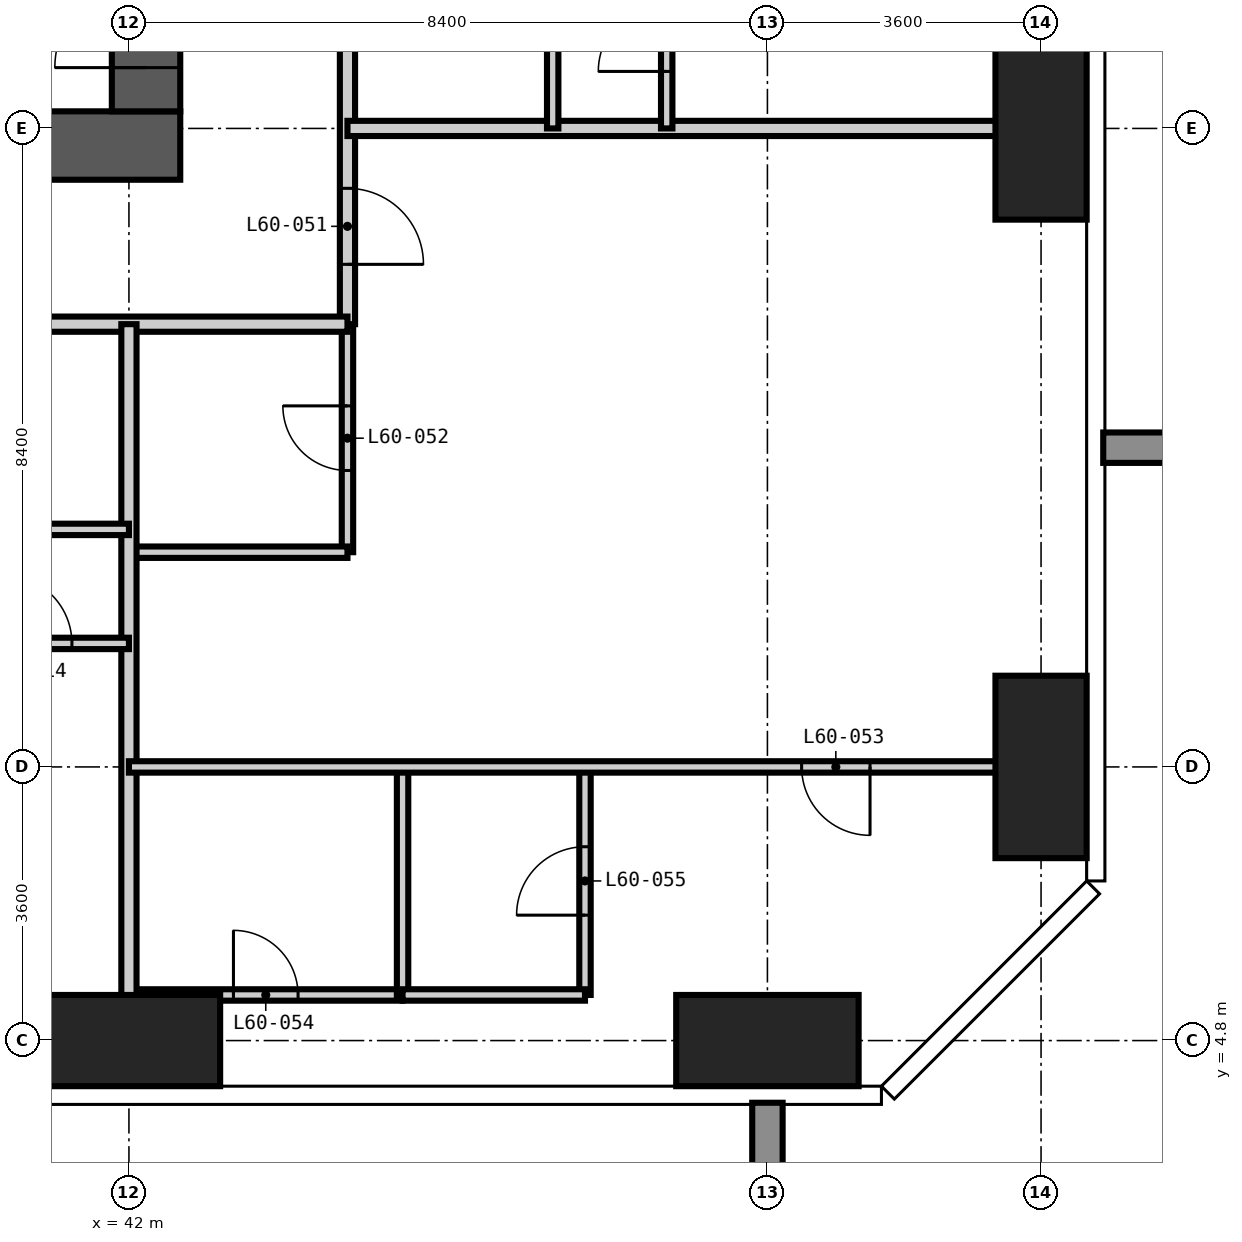
"""IFC4 building model, lengths in metres.
Left out: names, types, materials, properties, quantities, classifications, styles, units other than length and angle.
Written with IfcOpenShell. Run it as: python <this file> out.ifc"""

import sys

from ifc_helpers import new_model, si_unit, direction, frame, frame_2d, origin, origin_2d, place, context, subcontext, project, spatial, rectangle, extrude, element, fill, save


model = new_model("IFC4")
c1 = context("Model", 3, precision=1e-05, world=origin(), true_north=direction((0.0, 1.0)))
c2 = subcontext(c1, "Body", "Model", "MODEL_VIEW")
j1 = project(units=[si_unit("LENGTHUNIT", "METRE"), si_unit("PLANEANGLEUNIT", "RADIAN")], contexts=[c1])
p1 = place(None, origin())
s1 = spatial("IfcSite", under=j1, at=p1, CompositionType="ELEMENT")
p2 = place(p1, origin())
s2 = spatial("IfcBuilding", under=s1, at=p2, CompositionType="ELEMENT")
p3 = place(p2, frame((0.0, 0.0, 233.4)))
s3 = spatial("IfcBuildingStorey", under=s2, at=p3, CompositionType="ELEMENT", Elevation=233.4)
for number, where, z_axis, x_axis in (
    (1, (42.0, 4.8, -0.35), (0.0, 0.0, 1.0), (1.0, 0.0, 0.0)),
    (2, (50.4, 4.8, -0.35), (0.0, 0.0, 1.0), (1.0, 0.0, 0.0)),
):
    element("IfcColumn", number, at=place(p3, frame(where, z_axis=z_axis, x_axis=x_axis)), inside=s3, PredefinedType="COLUMN", context=c2, shape_type="SweptSolid", body=[
        extrude(rectangle(XDim=2.4, YDim=1.2, at=origin_2d()), origin(), (0.0, 0.0, 1.0), 3.9),
    ])
for number, where, z_axis, x_axis in (
    (3, (54.0, 8.4, -0.35), (0.0, 0.0, 1.0), (1.0, 0.0, 0.0)),
    (4, (54.0, 16.8, -0.35), (0.0, 0.0, 1.0), (1.0, 0.0, 0.0)),
):
    element("IfcColumn", number, at=place(p3, frame(where, z_axis=z_axis, x_axis=x_axis)), inside=s3, PredefinedType="COLUMN", context=c2, shape_type="SweptSolid", body=[
        extrude(rectangle(XDim=1.2, YDim=2.4, at=origin_2d()), origin(), (0.0, 0.0, 1.0), 3.9),
    ])
p4 = place(p3, frame((24.525, 16.575, -0.35), z_axis=(0.0, 0.0, 1.0), x_axis=(1.0, 0.0, 0.0)))
e5 = element("IfcWall", 5, at=p4, inside=s3, PredefinedType="SHEAR", context=c2, shape_type="SweptSolid", body=[
    extrude(rectangle(XDim=18.15, YDim=0.9, at=frame_2d((9.075, 0.0))), origin(), (0.0, 0.0, 1.0), 3.9),
])
p5 = place(p4, frame((4.375, 0.0, 0.35)))
e6 = element("IfcOpeningElement", 6, at=p5, cuts=e5, PredefinedType="OPENING", context=c2, shape_type="SweptSolid", body=[
    extrude(rectangle(XDim=1.0, YDim=2.1, at=frame_2d((0.5, 1.05))), frame((0.0, 0.46, 0.0), z_axis=(0.0, -1.0, 0.0), x_axis=(1.0, 0.0, 0.0)), (0.0, 0.0, 1.0), 0.92),
])
p6 = place(p4, frame((10.675, 0.0, 0.35)))
e7 = element("IfcOpeningElement", 7, at=p6, cuts=e5, PredefinedType="OPENING", context=c2, shape_type="SweptSolid", body=[
    extrude(rectangle(XDim=1.0, YDim=2.1, at=frame_2d((0.5, 1.05))), frame((0.0, 0.46, 0.0), z_axis=(0.0, -1.0, 0.0), x_axis=(1.0, 0.0, 0.0)), (0.0, 0.0, 1.0), 0.92),
])
p7 = place(p3, frame((42.225, 17.025, -0.35), z_axis=(0.0, 0.0, 1.0), x_axis=(0.0, 1.0, 0.0)))
e8 = element("IfcWall", 8, at=p7, inside=s3, PredefinedType="SHEAR", context=c2, shape_type="SweptSolid", body=[
    extrude(rectangle(XDim=24.75, YDim=0.9, at=frame_2d((12.375, 0.0))), origin(), (0.0, 0.0, 1.0), 3.9),
])
p8 = place(p7, frame((0.575, 0.0, 0.35)))
e9 = element("IfcOpeningElement", 9, at=p8, cuts=e8, PredefinedType="OPENING", context=c2, shape_type="SweptSolid", body=[
    extrude(rectangle(XDim=1.2, YDim=2.2, at=frame_2d((0.6, 1.1))), frame((0.0, 0.46, 0.0), z_axis=(0.0, -1.0, 0.0), x_axis=(1.0, 0.0, 0.0)), (0.0, 0.0, 1.0), 0.92),
])
p9 = place(p7, frame((11.475, 0.0, 0.35)))
e10 = element("IfcOpeningElement", 10, at=p9, cuts=e8, PredefinedType="OPENING", context=c2, shape_type="SweptSolid", body=[
    extrude(rectangle(XDim=1.8, YDim=2.2, at=frame_2d((0.9, 1.1))), frame((0.0, 0.46, 0.0), z_axis=(0.0, -1.0, 0.0), x_axis=(1.0, 0.0, 0.0)), (0.0, 0.0, 1.0), 0.92),
])
p10 = place(p7, frame((20.275, 0.0, 0.35)))
e11 = element("IfcOpeningElement", 11, at=p10, cuts=e8, PredefinedType="OPENING", context=c2, shape_type="SweptSolid", body=[
    extrude(rectangle(XDim=1.0, YDim=2.1, at=frame_2d((0.5, 1.05))), frame((0.0, 0.46, 0.0), z_axis=(0.0, -1.0, 0.0), x_axis=(1.0, 0.0, 0.0)), (0.0, 0.0, 1.0), 0.92),
])
p11 = place(p3, frame((44.875, 11.225, 0.0), z_axis=(0.0, 0.0, 1.0), x_axis=(0.0, 1.0, 0.0)))
e12 = element("IfcWall", 12, at=p11, inside=s3, PredefinedType="PARTITIONING", context=c2, shape_type="SweptSolid", body=[
    extrude(rectangle(XDim=3.0, YDim=0.15, at=frame_2d((1.5, 0.0))), origin(), (0.0, 0.0, 1.0), 3.55),
])
p12 = place(p11, frame((1.075, 0.0, 0.0)))
e13 = element("IfcOpeningElement", 13, at=p12, cuts=e12, PredefinedType="OPENING", context=c2, shape_type="SweptSolid", body=[
    extrude(rectangle(XDim=0.85, YDim=2.1, at=frame_2d((0.425, 1.05))), frame((0.0, 0.085, 0.0), z_axis=(0.0, -1.0, 0.0), x_axis=(1.0, 0.0, 0.0)), (0.0, 0.0, 1.0), 0.17),
])
p13 = place(p3, frame((42.0, 5.4, 0.0), z_axis=(0.0, 0.0, 1.0), x_axis=(1.0, 0.0, 0.0)))
e14 = element("IfcWall", 14, at=p13, inside=s3, PredefinedType="PARTITIONING", context=c2, shape_type="SweptSolid", body=[
    extrude(rectangle(XDim=3.6, YDim=0.15, at=frame_2d((1.8, 0.0))), origin(), (0.0, 0.0, 1.0), 3.55),
])
p14 = place(p13, frame((1.375, 0.0, 0.0)))
e15 = element("IfcOpeningElement", 15, at=p14, cuts=e14, PredefinedType="OPENING", context=c2, shape_type="SweptSolid", body=[
    extrude(rectangle(XDim=0.85, YDim=2.1, at=frame_2d((0.425, 1.05))), frame((0.0, 0.085, 0.0), z_axis=(0.0, -1.0, 0.0), x_axis=(1.0, 0.0, 0.0)), (0.0, 0.0, 1.0), 0.17),
])
p15 = place(p3, frame((42.0, 11.225, 0.0), z_axis=(0.0, 0.0, 1.0), x_axis=(1.0, 0.0, 0.0)))
e16 = element("IfcWall", 16, at=p15, inside=s3, PredefinedType="PARTITIONING", context=c2, shape_type="SweptSolid", body=[
    extrude(rectangle(XDim=2.875, YDim=0.15, at=frame_2d((1.438, 0.0))), origin(), (0.0, 0.0, 1.0), 3.55),
])
p16 = place(p3, frame((44.875, 29.4, 0.0), z_axis=(0.0, 0.0, 1.0), x_axis=(0.0, -1.0, 0.0)))
e17 = element("IfcWall", 17, at=p16, inside=s3, PredefinedType="PARTITIONING", context=c2, shape_type="SweptSolid", body=[
    extrude(rectangle(XDim=15.175, YDim=0.2, at=frame_2d((7.587, 0.0))), origin(), (0.0, 0.0, 1.0), 3.55),
])
p17 = place(p16, frame((5.8, 0.0, 0.0)))
e18 = element("IfcOpeningElement", 18, at=p17, cuts=e17, PredefinedType="OPENING", context=c2, shape_type="SweptSolid", body=[
    extrude(rectangle(XDim=1.0, YDim=2.2, at=frame_2d((0.5, 1.1))), frame((0.0, 0.11, 0.0), z_axis=(0.0, -1.0, 0.0), x_axis=(1.0, 0.0, 0.0)), (0.0, 0.0, 1.0), 0.22),
])
p18 = place(p16, frame((13.388, 0.0, 0.0)))
e19 = element("IfcOpeningElement", 19, at=p18, cuts=e17, PredefinedType="OPENING", context=c2, shape_type="SweptSolid", body=[
    extrude(rectangle(XDim=1.0, YDim=2.2, at=frame_2d((0.5, 1.1))), frame((0.0, 0.11, 0.0), z_axis=(0.0, -1.0, 0.0), x_axis=(1.0, 0.0, 0.0)), (0.0, 0.0, 1.0), 0.22),
])
p19 = place(p3, frame((44.875, 14.225, 0.0), z_axis=(0.0, 0.0, 1.0), x_axis=(-1.0, 0.0, 0.0)))
e20 = element("IfcWall", 20, at=p19, inside=s3, PredefinedType="PARTITIONING", context=c2, shape_type="SweptSolid", body=[
    extrude(rectangle(XDim=22.25, YDim=0.2, at=frame_2d((11.125, 0.0))), origin(), (0.0, 0.0, 1.0), 3.55),
])
p20 = place(p19, frame((15.875, 0.0, 0.0)))
e21 = element("IfcOpeningElement", 21, at=p20, cuts=e20, PredefinedType="OPENING", context=c2, shape_type="SweptSolid", body=[
    extrude(rectangle(XDim=1.0, YDim=2.2, at=frame_2d((0.5, 1.1))), frame((0.0, 0.11, 0.0), z_axis=(0.0, -1.0, 0.0), x_axis=(1.0, 0.0, 0.0)), (0.0, 0.0, 1.0), 0.22),
])
p21 = place(p19, frame((9.425, 0.0, 0.0)))
e22 = element("IfcOpeningElement", 22, at=p21, cuts=e20, PredefinedType="OPENING", context=c2, shape_type="SweptSolid", body=[
    extrude(rectangle(XDim=1.0, YDim=2.2, at=frame_2d((0.5, 1.1))), frame((0.0, 0.11, 0.0), z_axis=(0.0, -1.0, 0.0), x_axis=(1.0, 0.0, 0.0)), (0.0, 0.0, 1.0), 0.22),
])
p22 = place(p19, frame((5.675, 0.0, 0.0)))
e23 = element("IfcOpeningElement", 23, at=p22, cuts=e20, PredefinedType="OPENING", context=c2, shape_type="SweptSolid", body=[
    extrude(rectangle(XDim=1.0, YDim=2.2, at=frame_2d((0.5, 1.1))), frame((0.0, 0.11, 0.0), z_axis=(0.0, -1.0, 0.0), x_axis=(1.0, 0.0, 0.0)), (0.0, 0.0, 1.0), 0.22),
])
p23 = place(p3, frame((42.0, 4.182, 0.0), z_axis=(0.0, 0.0, 1.0), x_axis=(0.0, 1.0, 0.0)))
e24 = element("IfcWall", 24, at=p23, inside=s3, PredefinedType="PARTITIONING", context=c2, shape_type="SweptSolid", body=[
    extrude(rectangle(XDim=10.043, YDim=0.2, at=frame_2d((5.021, 0.0))), origin(), (0.0, 0.0, 1.0), 3.55),
])
p24 = place(p3, frame((44.875, 16.8, 0.0), z_axis=(0.0, 0.0, 1.0), x_axis=(1.0, 0.0, 0.0)))
e25 = element("IfcWall", 25, at=p24, inside=s3, PredefinedType="PARTITIONING", context=c2, shape_type="SweptSolid", body=[
    extrude(rectangle(XDim=9.743, YDim=0.2, at=frame_2d((4.872, 0.0))), origin(), (0.0, 0.0, 1.0), 3.55),
])
p25 = place(p3, frame((45.6, 5.4, 0.0), z_axis=(0.0, 0.0, 1.0), x_axis=(0.0, 1.0, 0.0)))
e26 = element("IfcWall", 26, at=p25, inside=s3, PredefinedType="PARTITIONING", context=c2, shape_type="SweptSolid", body=[
    extrude(rectangle(XDim=3.0, YDim=0.15, at=frame_2d((1.5, 0.0))), origin(), (0.0, 0.0, 1.0), 3.55),
])
p26 = place(p3, frame((47.575, 16.8, 0.0), z_axis=(0.0, 0.0, 1.0), x_axis=(0.0, 1.0, 0.0)))
e27 = element("IfcWall", 27, at=p26, inside=s3, PredefinedType="PARTITIONING", context=c2, shape_type="SweptSolid", body=[
    extrude(rectangle(XDim=2.4, YDim=0.15, at=frame_2d((1.2, 0.0))), origin(), (0.0, 0.0, 1.0), 3.55),
])
p27 = place(p3, frame((48.0, 5.4, 0.0), z_axis=(0.0, 0.0, 1.0), x_axis=(0.0, 1.0, 0.0)))
e28 = element("IfcWall", 28, at=p27, inside=s3, PredefinedType="PARTITIONING", context=c2, shape_type="SweptSolid", body=[
    extrude(rectangle(XDim=3.0, YDim=0.15, at=frame_2d((1.5, 0.0))), origin(), (0.0, 0.0, 1.0), 3.55),
])
p28 = place(p27, frame((1.05, 0.0, 0.0)))
e29 = element("IfcOpeningElement", 29, at=p28, cuts=e28, PredefinedType="OPENING", context=c2, shape_type="SweptSolid", body=[
    extrude(rectangle(XDim=0.9, YDim=2.1, at=frame_2d((0.45, 1.05))), frame((0.0, 0.085, 0.0), z_axis=(0.0, -1.0, 0.0), x_axis=(1.0, 0.0, 0.0)), (0.0, 0.0, 1.0), 0.17),
])
p29 = place(p3, frame((49.075, 16.8, 0.0), z_axis=(0.0, 0.0, 1.0), x_axis=(0.0, 1.0, 0.0)))
e30 = element("IfcWall", 30, at=p29, inside=s3, PredefinedType="PARTITIONING", context=c2, shape_type="SweptSolid", body=[
    extrude(rectangle(XDim=2.4, YDim=0.15, at=frame_2d((1.2, 0.0))), origin(), (0.0, 0.0, 1.0), 3.55),
])
p30 = place(p29, frame((0.75, 0.0, 0.0)))
e31 = element("IfcOpeningElement", 31, at=p30, cuts=e30, PredefinedType="OPENING", context=c2, shape_type="SweptSolid", body=[
    extrude(rectangle(XDim=0.9, YDim=2.1, at=frame_2d((0.45, 1.05))), frame((0.0, 0.085, 0.0), z_axis=(0.0, -1.0, 0.0), x_axis=(1.0, 0.0, 0.0)), (0.0, 0.0, 1.0), 0.17),
])
p31 = place(p3, frame((45.6, 5.4, 0.0), z_axis=(0.0, 0.0, 1.0), x_axis=(1.0, 0.0, 0.0)))
e32 = element("IfcWall", 32, at=p31, inside=s3, PredefinedType="PARTITIONING", context=c2, shape_type="SweptSolid", body=[
    extrude(rectangle(XDim=2.4, YDim=0.15, at=frame_2d((1.2, 0.0))), origin(), (0.0, 0.0, 1.0), 3.55),
])
p32 = place(p3, frame((42.0, 8.4, 0.0), z_axis=(0.0, 0.0, 1.0), x_axis=(1.0, 0.0, 0.0)))
e33 = element("IfcWall", 33, at=p32, inside=s3, PredefinedType="PARTITIONING", context=c2, shape_type="SweptSolid", body=[
    extrude(rectangle(XDim=12.618, YDim=0.15, at=frame_2d((6.309, 0.0))), origin(), (0.0, 0.0, 1.0), 3.55),
])
p33 = place(p32, frame((8.85, 0.0, 0.0)))
e34 = element("IfcOpeningElement", 34, at=p33, cuts=e33, PredefinedType="OPENING", context=c2, shape_type="SweptSolid", body=[
    extrude(rectangle(XDim=0.9, YDim=2.1, at=frame_2d((0.45, 1.05))), frame((0.0, 0.085, 0.0), z_axis=(0.0, -1.0, 0.0), x_axis=(1.0, 0.0, 0.0)), (0.0, 0.0, 1.0), 0.17),
])
p34 = place(p3, frame((39.6, 10.025, 0.0), z_axis=(0.0, 0.0, 1.0), x_axis=(1.0, 0.0, 0.0)))
e35 = element("IfcWall", 35, at=p34, inside=s3, PredefinedType="PARTITIONING", context=c2, shape_type="SweptSolid", body=[
    extrude(rectangle(XDim=2.4, YDim=0.15, at=frame_2d((1.2, 0.0))), origin(), (0.0, 0.0, 1.0), 3.55),
])
p35 = place(p34, frame((0.75, 0.0, 0.0)))
e36 = element("IfcOpeningElement", 36, at=p35, cuts=e35, PredefinedType="OPENING", context=c2, shape_type="SweptSolid", body=[
    extrude(rectangle(XDim=0.9, YDim=2.1, at=frame_2d((0.45, 1.05))), frame((0.0, 0.085, 0.0), z_axis=(0.0, -1.0, 0.0), x_axis=(1.0, 0.0, 0.0)), (0.0, 0.0, 1.0), 0.17),
])
p36 = place(p3, frame((39.6, 11.525, 0.0), z_axis=(0.0, 0.0, 1.0), x_axis=(1.0, 0.0, 0.0)))
e37 = element("IfcWall", 37, at=p36, inside=s3, PredefinedType="PARTITIONING", context=c2, shape_type="SweptSolid", body=[
    extrude(rectangle(XDim=2.4, YDim=0.15, at=frame_2d((1.2, 0.0))), origin(), (0.0, 0.0, 1.0), 3.55),
])
p37 = place(p8, origin())
e38 = element("IfcDoor", 38, at=p37, inside=s3, OperationType="SINGLE_SWING_LEFT", PredefinedType="DOOR", context=c2, shape_type="SweptSolid", body=[
    extrude(rectangle(XDim=1.2, YDim=2.2, at=frame_2d((0.6, 1.1))), frame((0.0, 0.025, 0.0), z_axis=(0.0, -1.0, 0.0), x_axis=(1.0, 0.0, 0.0)), (0.0, 0.0, 1.0), 0.05),
])
fill(e9, e38)
p38 = place(p35, origin())
e39 = element("IfcDoor", 39, at=p38, inside=s3, OperationType="SINGLE_SWING_LEFT", PredefinedType="DOOR", context=c2, shape_type="SweptSolid", body=[
    extrude(rectangle(XDim=0.9, YDim=2.1, at=frame_2d((0.45, 1.05))), frame((0.0, 0.025, 0.0), z_axis=(0.0, -1.0, 0.0), x_axis=(1.0, 0.0, 0.0)), (0.0, 0.0, 1.0), 0.05),
])
fill(e36, e39)
p39 = place(p30, origin())
e40 = element("IfcDoor", 40, at=p39, inside=s3, OperationType="SINGLE_SWING_LEFT", PredefinedType="DOOR", context=c2, shape_type="SweptSolid", body=[
    extrude(rectangle(XDim=0.9, YDim=2.1, at=frame_2d((0.45, 1.05))), frame((0.0, 0.025, 0.0), z_axis=(0.0, -1.0, 0.0), x_axis=(1.0, 0.0, 0.0)), (0.0, 0.0, 1.0), 0.05),
])
fill(e31, e40)
p40 = place(p18, origin())
e41 = element("IfcDoor", 41, at=p40, inside=s3, OperationType="SINGLE_SWING_RIGHT", PredefinedType="DOOR", context=c2, shape_type="SweptSolid", body=[
    extrude(rectangle(XDim=1.0, YDim=2.2, at=frame_2d((0.5, 1.1))), frame((0.0, 0.025, 0.0), z_axis=(0.0, -1.0, 0.0), x_axis=(1.0, 0.0, 0.0)), (0.0, 0.0, 1.0), 0.05),
])
fill(e19, e41)
p41 = place(p12, origin())
e42 = element("IfcDoor", 42, at=p41, inside=s3, OperationType="SINGLE_SWING_RIGHT", PredefinedType="DOOR", context=c2, shape_type="SweptSolid", body=[
    extrude(rectangle(XDim=0.85, YDim=2.1, at=frame_2d((0.425, 1.05))), frame((0.0, 0.025, 0.0), z_axis=(0.0, -1.0, 0.0), x_axis=(1.0, 0.0, 0.0)), (0.0, 0.0, 1.0), 0.05),
])
fill(e13, e42)
p42 = place(p33, frame((0.9, 0.0, 0.0), z_axis=(0.0, 0.0, 1.0), x_axis=(-1.0, 0.0, 0.0)))
e43 = element("IfcDoor", 43, at=p42, inside=s3, OperationType="SINGLE_SWING_LEFT", PredefinedType="DOOR", context=c2, shape_type="SweptSolid", body=[
    extrude(rectangle(XDim=0.9, YDim=2.1, at=frame_2d((0.45, 1.05))), frame((0.0, 0.025, 0.0), z_axis=(0.0, -1.0, 0.0), x_axis=(1.0, 0.0, 0.0)), (0.0, 0.0, 1.0), 0.05),
])
fill(e34, e43)
p43 = place(p14, origin())
e44 = element("IfcDoor", 44, at=p43, inside=s3, OperationType="SINGLE_SWING_LEFT", PredefinedType="DOOR", context=c2, shape_type="SweptSolid", body=[
    extrude(rectangle(XDim=0.85, YDim=2.1, at=frame_2d((0.425, 1.05))), frame((0.0, 0.025, 0.0), z_axis=(0.0, -1.0, 0.0), x_axis=(1.0, 0.0, 0.0)), (0.0, 0.0, 1.0), 0.05),
])
fill(e15, e44)
p44 = place(p28, origin())
e45 = element("IfcDoor", 45, at=p44, inside=s3, OperationType="SINGLE_SWING_LEFT", PredefinedType="DOOR", context=c2, shape_type="SweptSolid", body=[
    extrude(rectangle(XDim=0.9, YDim=2.1, at=frame_2d((0.45, 1.05))), frame((0.0, 0.025, 0.0), z_axis=(0.0, -1.0, 0.0), x_axis=(1.0, 0.0, 0.0)), (0.0, 0.0, 1.0), 0.05),
])
fill(e29, e45)
save(model, sys.argv[1])
